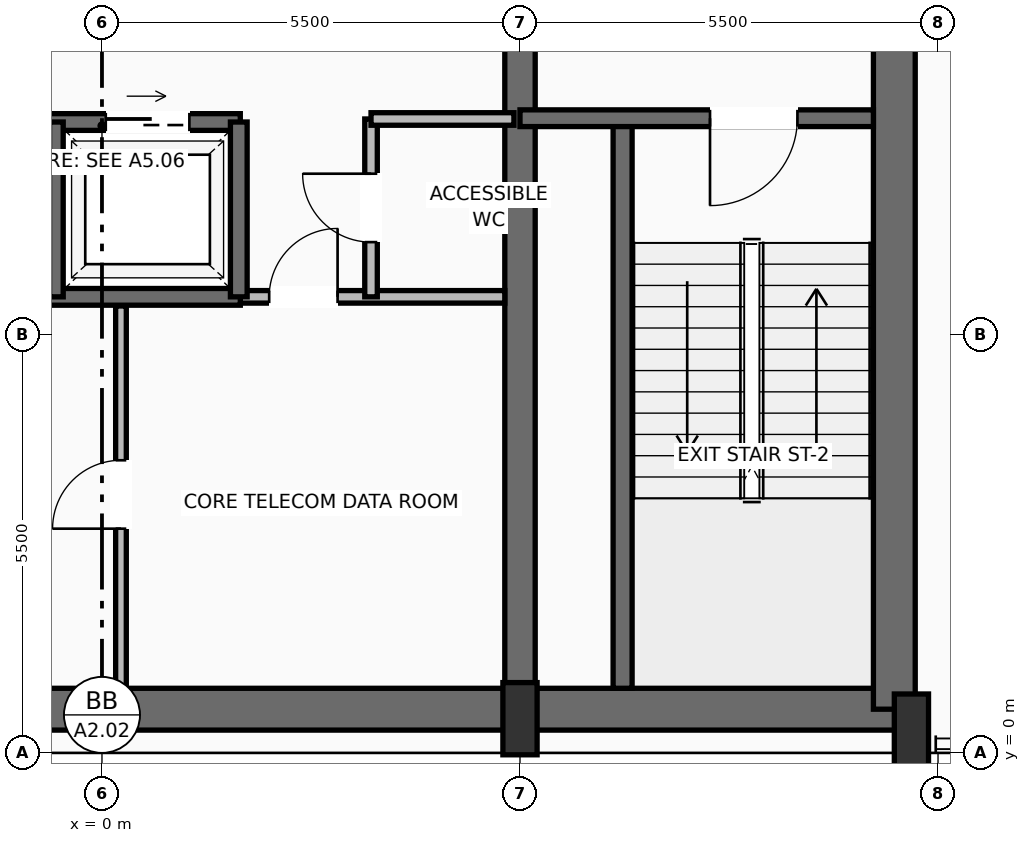
"""IFC4 building model, lengths in metres.
Left out: names, types, materials, properties, quantities, classifications, styles, units other than length and angle.
Written with IfcOpenShell. Run it as: python <this file> out.ifc"""

import sys

from ifc_helpers import new_model, si_unit, direction, frame, frame_2d, origin, origin_2d, place, context, subcontext, project, spatial, rectangle, extrude, source, transform, mapped, element, fill, save


model = new_model("IFC4")
c1 = context("Model", 3, precision=1e-05, world=origin(), true_north=direction((0.0, 1.0)))
c2 = subcontext(c1, "Body", "Model", "MODEL_VIEW")
j1 = project(units=[si_unit("LENGTHUNIT", "METRE"), si_unit("PLANEANGLEUNIT", "RADIAN")], contexts=[c1])
p1 = place(None, origin())
s1 = spatial("IfcSite", under=j1, at=p1, CompositionType="ELEMENT")
p2 = place(p1, origin())
s2 = spatial("IfcBuilding", under=s1, at=p2, CompositionType="ELEMENT")
p3 = place(p2, frame((0.0, 0.0, 215.4)))
s3 = spatial("IfcBuildingStorey", under=s2, at=p3, CompositionType="ELEMENT", Elevation=215.4)
p4 = place(p3, frame((-10.65, 0.575, 0.0), z_axis=(0.0, 0.0, 1.0), x_axis=(1.0, 0.0, 0.0)))
e1 = element("IfcWall", 1, at=p4, inside=s3, PredefinedType="SHEAR", context=c2, shape_type="SweptSolid", body=[
    extrude(rectangle(XDim=21.3, YDim=0.55, at=frame_2d((10.65, 0.0))), origin(), (0.0, 0.0, 1.0), 4.39),
])
p5 = place(p3, frame((10.425, 0.575, 0.0), z_axis=(0.0, 0.0, 1.0), x_axis=(0.0, 1.0, 0.0)))
e2 = element("IfcWall", 2, at=p5, inside=s3, PredefinedType="SHEAR", context=c2, shape_type="SweptSolid", body=[
    extrude(rectangle(XDim=15.45, YDim=0.55, at=frame_2d((7.725, 0.0))), origin(), (0.0, 0.0, 1.0), 4.39),
])
p6 = place(p3, frame((5.5, 0.575, 0.0), z_axis=(0.0, 0.0, 1.0), x_axis=(0.0, 1.0, 0.0)))
e3 = element("IfcWall", 3, at=p6, inside=s3, PredefinedType="SHEAR", context=c2, shape_type="SweptSolid", body=[
    extrude(rectangle(XDim=15.45, YDim=0.4, at=frame_2d((7.725, 0.0))), origin(), (0.0, 0.0, 1.0), 4.39),
])
p7 = place(p6, frame((8.925, 0.0, 0.0)))
e4 = element("IfcOpeningElement", 4, at=p7, cuts=e3, PredefinedType="OPENING", context=c2, shape_type="SweptSolid", body=[
    extrude(rectangle(XDim=1.1, YDim=2.2, at=frame_2d((0.55, 1.1))), frame((0.0, 0.21, 0.0), z_axis=(0.0, -1.0, 0.0), x_axis=(1.0, 0.0, 0.0)), (0.0, 0.0, 1.0), 0.42),
])
m1 = source(origin(), c2, "Body", "SweptSolid", [
    extrude(rectangle(XDim=0.45, YDim=0.95, at=origin_2d()), origin(), (0.0, 0.0, 1.0), 4.6),
])
for number, where, z_axis, x_axis in (
    (5, (5.5, 0.45, 0.0), (0.0, 0.0, 1.0), (1.0, 0.0, 0.0)),
    (6, (10.65, 0.3, 0.0), (0.0, 0.0, 1.0), (1.0, 0.0, 0.0)),
):
    element("IfcColumn", number, at=place(p3, frame(where, z_axis=z_axis, x_axis=x_axis)), inside=s3, PredefinedType="PILASTER", context=c2, shape_type="MappedRepresentation", body=[
        mapped(m1, transform((0.0, 0.0, 0.0), scale=1.0)),
    ])
p8 = place(p3, frame((6.85, 0.85, 0.0), z_axis=(0.0, 0.0, 1.0), x_axis=(0.0, 1.0, 0.0)))
e7 = element("IfcWall", 7, at=p8, inside=s3, PredefinedType="SOLIDWALL", context=c2, shape_type="SweptSolid", body=[
    extrude(rectangle(XDim=7.5, YDim=0.25, at=frame_2d((3.75, 0.0))), origin(), (0.0, 0.0, 1.0), 4.39),
])
p9 = place(p3, frame((10.15, 8.35, 0.0), z_axis=(0.0, 0.0, 1.0), x_axis=(-1.0, 0.0, 0.0)))
e8 = element("IfcWall", 8, at=p9, inside=s3, PredefinedType="SOLIDWALL", context=c2, shape_type="SweptSolid", body=[
    extrude(rectangle(XDim=4.65, YDim=0.22, at=frame_2d((2.325, 0.0))), origin(), (0.0, 0.0, 1.0), 4.39),
])
p10 = place(p9, frame((1.0, 0.0, 0.0)))
e9 = element("IfcOpeningElement", 9, at=p10, cuts=e8, PredefinedType="OPENING", context=c2, shape_type="SweptSolid", body=[
    extrude(rectangle(XDim=1.15, YDim=2.2, at=frame_2d((0.575, 1.1))), frame((0.0, 0.12, 0.0), z_axis=(0.0, -1.0, 0.0), x_axis=(1.0, 0.0, 0.0)), (0.0, 0.0, 1.0), 0.24),
])
p11 = place(p3, frame((1.82, 6.0, 0.0), z_axis=(0.0, 0.0, 1.0), x_axis=(1.0, 0.0, 0.0)))
e10 = element("IfcWall", 10, at=p11, inside=s3, PredefinedType="PARTITIONING", context=c2, shape_type="SweptSolid", body=[
    extrude(rectangle(XDim=3.48, YDim=0.165, at=frame_2d((1.74, 0.0))), origin(), (0.0, 0.0, 1.0), 4.382),
])
p12 = place(p11, frame((0.38, 0.0, 0.0)))
e11 = element("IfcOpeningElement", 11, at=p12, cuts=e10, PredefinedType="OPENING", context=c2, shape_type="SweptSolid", body=[
    extrude(rectangle(XDim=0.9, YDim=2.1, at=frame_2d((0.45, 1.05))), frame((0.0, 0.093, 0.0), z_axis=(0.0, -1.0, 0.0), x_axis=(1.0, 0.0, 0.0)), (0.0, 0.0, 1.0), 0.185),
])
p13 = place(p3, frame((0.25, 0.85, 0.0), z_axis=(0.0, 0.0, 1.0), x_axis=(0.0, 1.0, 0.0)))
e12 = element("IfcWall", 12, at=p13, inside=s3, PredefinedType="PARTITIONING", context=c2, shape_type="SweptSolid", body=[
    extrude(rectangle(XDim=5.03, YDim=0.14, at=frame_2d((2.515, 0.0))), origin(), (0.0, 0.0, 1.0), 4.382),
])
p14 = place(p13, frame((2.1, 0.0, 0.0)))
e13 = element("IfcOpeningElement", 13, at=p14, cuts=e12, PredefinedType="OPENING", context=c2, shape_type="SweptSolid", body=[
    extrude(rectangle(XDim=0.9, YDim=2.1, at=frame_2d((0.45, 1.05))), frame((0.0, 0.08, 0.0), z_axis=(0.0, -1.0, 0.0), x_axis=(1.0, 0.0, 0.0)), (0.0, 0.0, 1.0), 0.16),
])
p15 = place(p3, frame((3.54, 6.0, 0.0), z_axis=(0.0, 0.0, 1.0), x_axis=(0.0, 1.0, 0.0)))
e14 = element("IfcWall", 14, at=p15, inside=s3, PredefinedType="PARTITIONING", context=c2, shape_type="SweptSolid", body=[
    extrude(rectangle(XDim=2.34, YDim=0.165, at=frame_2d((1.17, 0.0))), origin(), (0.0, 0.0, 1.0), 4.382),
])
p16 = place(p15, frame((0.72, 0.0, 0.0)))
e15 = element("IfcOpeningElement", 15, at=p16, cuts=e14, PredefinedType="OPENING", context=c2, shape_type="SweptSolid", body=[
    extrude(rectangle(XDim=0.9, YDim=2.1, at=frame_2d((0.45, 1.05))), frame((0.0, 0.093, 0.0), z_axis=(0.0, -1.0, 0.0), x_axis=(1.0, 0.0, 0.0)), (0.0, 0.0, 1.0), 0.185),
])
p17 = place(p3, frame((3.54, 8.34, 0.0), z_axis=(0.0, 0.0, 1.0), x_axis=(1.0, 0.0, 0.0)))
e16 = element("IfcWall", 16, at=p17, inside=s3, PredefinedType="PARTITIONING", context=c2, shape_type="SweptSolid", body=[
    extrude(rectangle(XDim=1.88, YDim=0.165, at=frame_2d((0.94, 0.0))), origin(), (0.0, 0.0, 1.0), 4.382),
])
p18 = place(p3, frame((-5.5, 6.0, 0.0), z_axis=(0.0, 0.0, 1.0), x_axis=(1.0, 0.0, 0.0)))
e17 = element("IfcWall", 17, at=p18, inside=s3, PredefinedType="SOLIDWALL", context=c2, shape_type="SweptSolid", body=[
    extrude(rectangle(XDim=7.32, YDim=0.22, at=frame_2d((3.66, 0.0))), origin(), (0.0, 0.0, 1.0), 4.39),
])
p19 = place(p3, frame((-5.5, 8.3, 0.0), z_axis=(0.0, 0.0, 1.0), x_axis=(1.0, 0.0, 0.0)))
e18 = element("IfcWall", 18, at=p19, inside=s3, PredefinedType="SOLIDWALL", context=c2, shape_type="SweptSolid", body=[
    extrude(rectangle(XDim=7.32, YDim=0.22, at=frame_2d((3.66, 0.0))), origin(), (0.0, 0.0, 1.0), 4.39),
])
p20 = place(p19, frame((0.75, 0.0, 0.0)))
e19 = element("IfcOpeningElement", 19, at=p20, cuts=e18, PredefinedType="OPENING", context=c2, shape_type="SweptSolid", body=[
    extrude(rectangle(XDim=1.1, YDim=2.2, at=frame_2d((0.55, 1.1))), frame((0.0, 0.12, 0.0), z_axis=(0.0, -1.0, 0.0), x_axis=(1.0, 0.0, 0.0)), (0.0, 0.0, 1.0), 0.24),
])
p21 = place(p19, frame((3.15, 0.0, 0.0)))
e20 = element("IfcOpeningElement", 20, at=p21, cuts=e18, PredefinedType="OPENING", context=c2, shape_type="SweptSolid", body=[
    extrude(rectangle(XDim=1.1, YDim=2.2, at=frame_2d((0.55, 1.1))), frame((0.0, 0.12, 0.0), z_axis=(0.0, -1.0, 0.0), x_axis=(1.0, 0.0, 0.0)), (0.0, 0.0, 1.0), 0.24),
])
p22 = place(p19, frame((5.55, 0.0, 0.0)))
e21 = element("IfcOpeningElement", 21, at=p22, cuts=e18, PredefinedType="OPENING", context=c2, shape_type="SweptSolid", body=[
    extrude(rectangle(XDim=1.1, YDim=2.2, at=frame_2d((0.55, 1.1))), frame((0.0, 0.12, 0.0), z_axis=(0.0, -1.0, 0.0), x_axis=(1.0, 0.0, 0.0)), (0.0, 0.0, 1.0), 0.24),
])
p23 = place(p3, frame((1.8, 6.0, 0.0), z_axis=(0.0, 0.0, 1.0), x_axis=(0.0, 1.0, 0.0)))
e22 = element("IfcWall", 22, at=p23, inside=s3, PredefinedType="SOLIDWALL", context=c2, shape_type="SweptSolid", body=[
    extrude(rectangle(XDim=2.3, YDim=0.22, at=frame_2d((1.15, 0.0))), origin(), (0.0, 0.0, 1.0), 4.39),
])
p24 = place(p3, frame((-0.6, 6.0, 0.0), z_axis=(0.0, 0.0, 1.0), x_axis=(0.0, 1.0, 0.0)))
e23 = element("IfcWall", 23, at=p24, inside=s3, PredefinedType="SOLIDWALL", context=c2, shape_type="SweptSolid", body=[
    extrude(rectangle(XDim=2.3, YDim=0.18, at=frame_2d((1.15, 0.0))), origin(), (0.0, 0.0, 1.0), 4.39),
])
m2 = source(origin(), c2, "Body", "SweptSolid", [
    extrude(rectangle(XDim=1.15, YDim=2.2, at=frame_2d((0.575, 1.1))), frame((0.0, 0.025, 0.0), z_axis=(0.0, -1.0, 0.0), x_axis=(1.0, 0.0, 0.0)), (0.0, 0.0, 1.0), 0.05),
])
p25 = place(p10, origin())
e24 = element("IfcDoor", 24, at=p25, inside=s3, OperationType="SINGLE_SWING_RIGHT", PredefinedType="DOOR", context=c2, shape_type="MappedRepresentation", body=[
    mapped(m2, transform((0.0, 0.0, 0.0), scale=1.0)),
])
fill(e9, e24)
m3 = source(origin(), c2, "Body", "SweptSolid", [
    extrude(rectangle(XDim=0.9, YDim=2.1, at=frame_2d((0.45, 1.05))), frame((0.0, 0.025, 0.0), z_axis=(0.0, -1.0, 0.0), x_axis=(1.0, 0.0, 0.0)), (0.0, 0.0, 1.0), 0.05),
])
p26 = place(p12, origin())
e25 = element("IfcDoor", 25, at=p26, inside=s3, OperationType="SINGLE_SWING_RIGHT", PredefinedType="DOOR", context=c2, shape_type="MappedRepresentation", body=[
    mapped(m3, transform((0.0, 0.0, 0.0), scale=1.0)),
])
fill(e11, e25)
p27 = place(p14, origin())
e26 = element("IfcDoor", 26, at=p27, inside=s3, OperationType="SINGLE_SWING_LEFT", PredefinedType="DOOR", context=c2, shape_type="MappedRepresentation", body=[
    mapped(m3, transform((0.0, 0.0, 0.0), scale=1.0)),
])
fill(e13, e26)
p28 = place(p16, origin())
e27 = element("IfcDoor", 27, at=p28, inside=s3, OperationType="SINGLE_SWING_RIGHT", PredefinedType="DOOR", context=c2, shape_type="MappedRepresentation", body=[
    mapped(m3, transform((0.0, 0.0, 0.0), scale=1.0)),
])
fill(e15, e27)
m4 = source(origin(), c2, "Body", "SweptSolid", [
    extrude(rectangle(XDim=1.1, YDim=2.2, at=frame_2d((0.55, 1.1))), frame((0.0, 0.025, 0.0), z_axis=(0.0, -1.0, 0.0), x_axis=(1.0, 0.0, 0.0)), (0.0, 0.0, 1.0), 0.05),
])
p29 = place(p22, origin())
e28 = element("IfcDoor", 28, at=p29, inside=s3, OperationType="SLIDING_TO_LEFT", PredefinedType="DOOR", context=c2, shape_type="MappedRepresentation", body=[
    mapped(m4, transform((0.0, 0.0, 0.0), scale=1.0)),
])
fill(e21, e28)
save(model, sys.argv[1])
